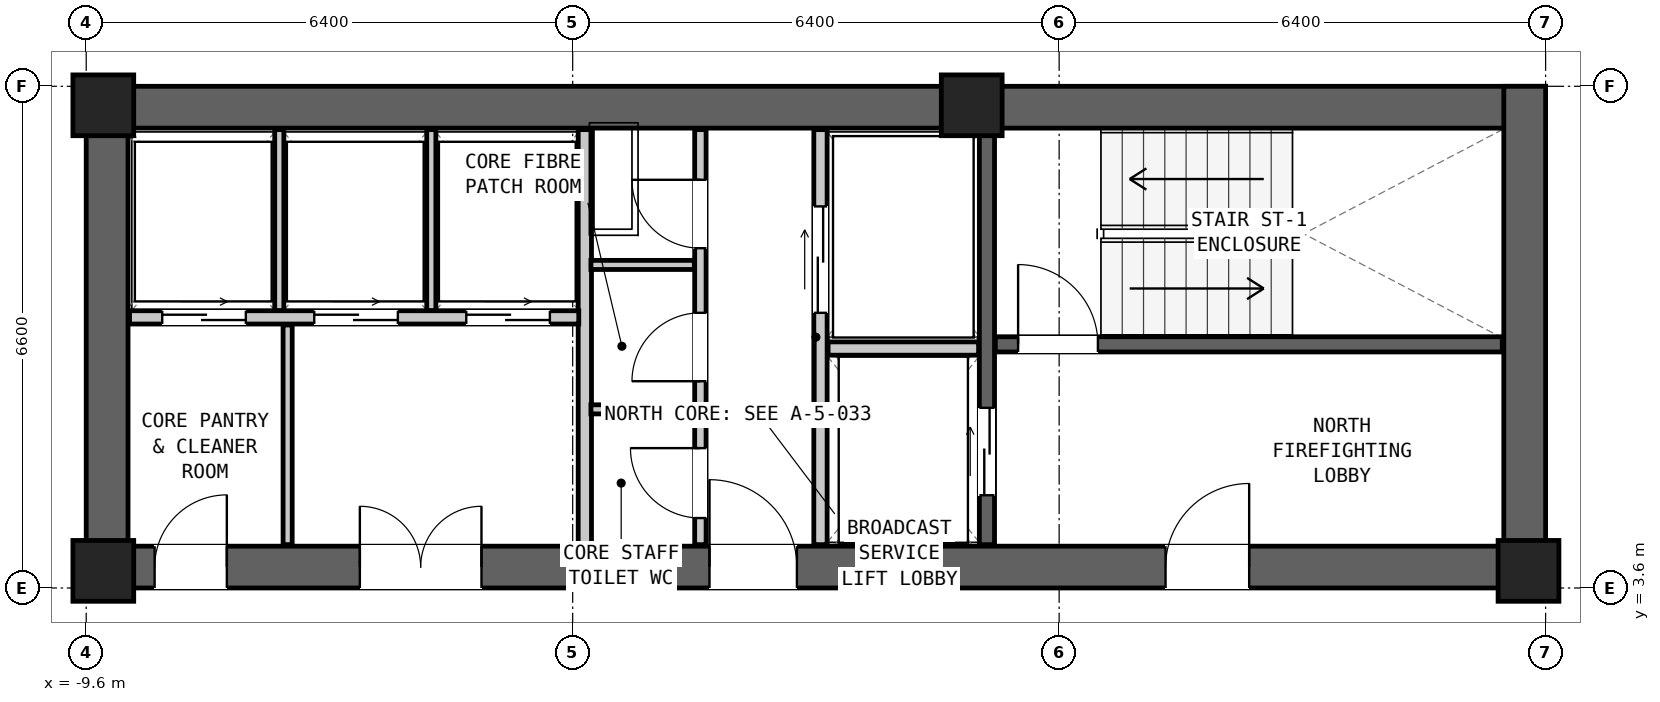
"""IFC4 building model, lengths in metres.
Left out: names, types, materials, properties, quantities, classifications, styles, units other than length and angle.
Written with IfcOpenShell. Run it as: python <this file> out.ifc"""

import sys

from ifc_helpers import new_model, si_unit, direction, frame, frame_2d, origin, origin_2d, place, context, subcontext, project, spatial, rectangle, extrude, element, fill, save


model = new_model("IFC4")
c1 = context("Model", 3, precision=1e-05, world=origin(), true_north=direction((0.0, 1.0)))
c2 = subcontext(c1, "Body", "Model", "MODEL_VIEW")
j1 = project(units=[si_unit("LENGTHUNIT", "METRE"), si_unit("PLANEANGLEUNIT", "RADIAN")], contexts=[c1])
p1 = place(None, origin())
s1 = spatial("IfcSite", under=j1, at=p1, CompositionType="ELEMENT")
p2 = place(p1, origin())
s2 = spatial("IfcBuilding", under=s1, at=p2, CompositionType="ELEMENT")
p3 = place(p2, frame((0.0, 0.0, 104.85)))
s3 = spatial("IfcBuildingStorey", under=s2, at=p3, CompositionType="ELEMENT", Elevation=104.85)
p4 = place(p3, frame((-9.6, 9.925, 0.0), z_axis=(0.0, 0.0, 1.0), x_axis=(1.0, 0.0, 0.0)))
e1 = element("IfcWall", 1, at=p4, inside=s3, PredefinedType="SHEAR", context=c2, shape_type="SweptSolid", body=[
    extrude(rectangle(XDim=19.2, YDim=0.55, at=frame_2d((9.6, 0.0))), origin(), (0.0, 0.0, 1.0), 3.6),
])
p5 = place(p3, frame((-9.6, 3.875, 0.0), z_axis=(0.0, 0.0, 1.0), x_axis=(1.0, 0.0, 0.0)))
e2 = element("IfcWall", 2, at=p5, inside=s3, PredefinedType="SHEAR", context=c2, shape_type="SweptSolid", body=[
    extrude(rectangle(XDim=19.2, YDim=0.55, at=frame_2d((9.6, 0.0))), origin(), (0.0, 0.0, 1.0), 3.6),
])
p6 = place(p5, frame((14.2, 0.0, 0.0)))
e3 = element("IfcOpeningElement", 3, at=p6, cuts=e2, PredefinedType="OPENING", context=c2, shape_type="SweptSolid", body=[
    extrude(rectangle(XDim=1.1, YDim=2.08, at=frame_2d((0.55, 1.04))), frame((0.0, 0.287, 0.0), z_axis=(0.0, -1.0, 0.0), x_axis=(1.0, 0.0, 0.0)), (0.0, 0.0, 1.0), 0.574),
])
p7 = place(p5, frame((8.2, 0.0, 0.0)))
e4 = element("IfcOpeningElement", 4, at=p7, cuts=e2, PredefinedType="OPENING", context=c2, shape_type="SweptSolid", body=[
    extrude(rectangle(XDim=1.15, YDim=2.1, at=frame_2d((0.575, 1.05))), frame((0.0, 0.287, 0.0), z_axis=(0.0, -1.0, 0.0), x_axis=(1.0, 0.0, 0.0)), (0.0, 0.0, 1.0), 0.574),
])
p8 = place(p5, frame((0.9, 0.0, 0.0)))
e5 = element("IfcOpeningElement", 5, at=p8, cuts=e2, PredefinedType="OPENING", context=c2, shape_type="SweptSolid", body=[
    extrude(rectangle(XDim=0.95, YDim=2.1, at=frame_2d((0.475, 1.05))), frame((0.0, 0.287, 0.0), z_axis=(0.0, -1.0, 0.0), x_axis=(1.0, 0.0, 0.0)), (0.0, 0.0, 1.0), 0.574),
])
p9 = place(p5, frame((3.6, 0.0, 0.0)))
e6 = element("IfcOpeningElement", 6, at=p9, cuts=e2, PredefinedType="OPENING", context=c2, shape_type="SweptSolid", body=[
    extrude(rectangle(XDim=1.6, YDim=2.12, at=frame_2d((0.8, 1.06))), frame((0.0, 0.287, 0.0), z_axis=(0.0, -1.0, 0.0), x_axis=(1.0, 0.0, 0.0)), (0.0, 0.0, 1.0), 0.574),
])
for number, where, z_axis, x_axis in (
    (7, (-9.325, 3.6, 0.0), (0.0, 0.0, 1.0), (0.0, 1.0, 0.0)),
    (8, (9.325, 3.6, 0.0), (0.0, 0.0, 1.0), (0.0, 1.0, 0.0)),
):
    element("IfcWall", number, at=place(p3, frame(where, z_axis=z_axis, x_axis=x_axis)), inside=s3, PredefinedType="SHEAR", context=c2, shape_type="SweptSolid", body=[
        extrude(rectangle(XDim=6.6, YDim=0.55, at=frame_2d((3.3, 0.0))), origin(), (0.0, 0.0, 1.0), 3.6),
    ])
for number, where, z_axis, x_axis in (
    (9, (-9.375, 9.95, 0.0), (0.0, 0.0, 1.0), (1.0, 0.0, 0.0)),
    (10, (2.05, 9.95, 0.0), (0.0, 0.0, 1.0), (1.0, 0.0, 0.0)),
    (11, (-9.375, 3.825, 0.0), (0.0, 0.0, 1.0), (1.0, 0.0, 0.0)),
    (12, (9.375, 3.825, 0.0), (0.0, 0.0, 1.0), (1.0, 0.0, 0.0)),
):
    element("IfcColumn", number, at=place(p3, frame(where, z_axis=z_axis, x_axis=x_axis)), inside=s3, PredefinedType="COLUMN", context=c2, shape_type="SweptSolid", body=[
        extrude(rectangle(XDim=0.8, YDim=0.8, at=origin_2d()), origin(), (0.0, 0.0, 1.0), 3.6),
    ])
p10 = place(p3, frame((2.36, 6.805, 0.0), z_axis=(0.0, 0.0, 1.0), x_axis=(1.0, 0.0, 0.0)))
e13 = element("IfcWall", 13, at=p10, inside=s3, PredefinedType="SHEAR", context=c2, shape_type="SweptSolid", body=[
    extrude(rectangle(XDim=6.67, YDim=0.2, at=frame_2d((3.335, 0.0))), origin(), (0.0, 0.0, 1.0), 3.22),
])
p11 = place(p10, frame((0.3, 0.0, 0.0)))
e14 = element("IfcOpeningElement", 14, at=p11, cuts=e13, PredefinedType="OPENING", context=c2, shape_type="SweptSolid", body=[
    extrude(rectangle(XDim=1.05, YDim=2.08, at=frame_2d((0.525, 1.04))), frame((0.0, 0.112, 0.0), z_axis=(0.0, -1.0, 0.0), x_axis=(1.0, 0.0, 0.0)), (0.0, 0.0, 1.0), 0.224),
])
p12 = place(p3, frame((2.25, 4.17, 0.0), z_axis=(0.0, 0.0, 1.0), x_axis=(0.0, 1.0, 0.0)))
e15 = element("IfcWall", 15, at=p12, inside=s3, PredefinedType="SHEAR", context=c2, shape_type="SweptSolid", body=[
    extrude(rectangle(XDim=5.46, YDim=0.2, at=frame_2d((2.73, 0.0))), origin(), (0.0, 0.0, 1.0), 3.22),
])
p13 = place(p12, frame((0.65, 0.0, 0.0)))
e16 = element("IfcOpeningElement", 16, at=p13, cuts=e15, PredefinedType="OPENING", context=c2, shape_type="SweptSolid", body=[
    extrude(rectangle(XDim=1.15, YDim=2.08, at=frame_2d((0.575, 1.04))), frame((0.0, 0.112, 0.0), z_axis=(0.0, -1.0, 0.0), x_axis=(1.0, 0.0, 0.0)), (0.0, 0.0, 1.0), 0.224),
])
p14 = place(p3, frame((0.06, 4.17, 0.0), z_axis=(0.0, 0.0, 1.0), x_axis=(0.0, 1.0, 0.0)))
e17 = element("IfcWall", 17, at=p14, inside=s3, PredefinedType="PARTITIONING", context=c2, shape_type="SweptSolid", body=[
    extrude(rectangle(XDim=5.46, YDim=0.175, at=frame_2d((2.73, 0.0))), origin(), (0.0, 0.0, 1.0), 3.22),
])
p15 = place(p14, frame((3.05, 0.0, 0.0)))
e18 = element("IfcOpeningElement", 18, at=p15, cuts=e17, PredefinedType="OPENING", context=c2, shape_type="SweptSolid", body=[
    extrude(rectangle(XDim=1.4, YDim=2.12, at=frame_2d((0.7, 1.06))), frame((0.0, 0.1, 0.0), z_axis=(0.0, -1.0, 0.0), x_axis=(1.0, 0.0, 0.0)), (0.0, 0.0, 1.0), 0.199),
])
p16 = place(p3, frame((0.16, 6.75, 0.0), z_axis=(0.0, 0.0, 1.0), x_axis=(1.0, 0.0, 0.0)))
e19 = element("IfcWall", 19, at=p16, inside=s3, PredefinedType="PARTITIONING", context=c2, shape_type="SweptSolid", body=[
    extrude(rectangle(XDim=1.98, YDim=0.175, at=frame_2d((0.99, 0.0))), origin(), (0.0, 0.0, 1.0), 3.22),
])
p17 = place(p3, frame((-3.04, 4.17, 0.0), z_axis=(0.0, 0.0, 1.0), x_axis=(0.0, 1.0, 0.0)))
e20 = element("IfcWall", 20, at=p17, inside=s3, PredefinedType="PARTITIONING", context=c2, shape_type="SweptSolid", body=[
    extrude(rectangle(XDim=5.46, YDim=0.175, at=frame_2d((2.73, 0.0))), origin(), (0.0, 0.0, 1.0), 3.22),
])
p18 = place(p3, frame((-1.52, 4.17, 0.0), z_axis=(0.0, 0.0, 1.0), x_axis=(0.0, 1.0, 0.0)))
e21 = element("IfcWall", 21, at=p18, inside=s3, PredefinedType="PARTITIONING", context=c2, shape_type="SweptSolid", body=[
    extrude(rectangle(XDim=5.46, YDim=0.15, at=frame_2d((2.73, 0.0))), origin(), (0.0, 0.0, 1.0), 3.22),
])
p19 = place(p18, frame((3.9, 0.0, 0.0)))
e22 = element("IfcOpeningElement", 22, at=p19, cuts=e21, PredefinedType="OPENING", context=c2, shape_type="SweptSolid", body=[
    extrude(rectangle(XDim=0.9, YDim=2.05, at=frame_2d((0.45, 1.025))), frame((0.0, 0.087, 0.0), z_axis=(0.0, -1.0, 0.0), x_axis=(1.0, 0.0, 0.0)), (0.0, 0.0, 1.0), 0.174),
])
p20 = place(p18, frame((2.15, 0.0, 0.0)))
e23 = element("IfcOpeningElement", 23, at=p20, cuts=e21, PredefinedType="OPENING", context=c2, shape_type="SweptSolid", body=[
    extrude(rectangle(XDim=0.9, YDim=2.05, at=frame_2d((0.45, 1.025))), frame((0.0, 0.087, 0.0), z_axis=(0.0, -1.0, 0.0), x_axis=(1.0, 0.0, 0.0)), (0.0, 0.0, 1.0), 0.174),
])
p21 = place(p18, frame((0.35, 0.0, 0.0)))
e24 = element("IfcOpeningElement", 24, at=p21, cuts=e21, PredefinedType="OPENING", context=c2, shape_type="SweptSolid", body=[
    extrude(rectangle(XDim=0.92, YDim=2.1, at=frame_2d((0.46, 1.05))), frame((0.0, 0.087, 0.0), z_axis=(0.0, -1.0, 0.0), x_axis=(1.0, 0.0, 0.0)), (0.0, 0.0, 1.0), 0.174),
])
for number, where, z_axis, x_axis in (
    (25, (-2.96, 5.95, 0.0), (0.0, 0.0, 1.0), (1.0, 0.0, 0.0)),
    (26, (-2.96, 7.85, 0.0), (0.0, 0.0, 1.0), (1.0, 0.0, 0.0)),
):
    element("IfcWall", number, at=place(p3, frame(where, z_axis=z_axis, x_axis=x_axis)), inside=s3, PredefinedType="PARTITIONING", context=c2, shape_type="SweptSolid", body=[
        extrude(rectangle(XDim=1.36, YDim=0.12, at=frame_2d((0.68, 0.0))), origin(), (0.0, 0.0, 1.0), 3.22),
    ])
p22 = place(p3, frame((-9.03, 7.16, 0.0), z_axis=(0.0, 0.0, 1.0), x_axis=(1.0, 0.0, 0.0)))
e27 = element("IfcWall", 27, at=p22, inside=s3, PredefinedType="PARTITIONING", context=c2, shape_type="SweptSolid", body=[
    extrude(rectangle(XDim=5.91, YDim=0.175, at=frame_2d((2.955, 0.0))), origin(), (0.0, 0.0, 1.0), 3.22),
])
p23 = place(p22, frame((0.43, 0.0, 0.0)))
e28 = element("IfcOpeningElement", 28, at=p23, cuts=e27, PredefinedType="OPENING", context=c2, shape_type="SweptSolid", body=[
    extrude(rectangle(XDim=1.1, YDim=2.06, at=frame_2d((0.55, 1.03))), frame((0.0, 0.1, 0.0), z_axis=(0.0, -1.0, 0.0), x_axis=(1.0, 0.0, 0.0)), (0.0, 0.0, 1.0), 0.199),
])
p24 = place(p22, frame((2.43, 0.0, 0.0)))
e29 = element("IfcOpeningElement", 29, at=p24, cuts=e27, PredefinedType="OPENING", context=c2, shape_type="SweptSolid", body=[
    extrude(rectangle(XDim=1.1, YDim=2.06, at=frame_2d((0.55, 1.03))), frame((0.0, 0.1, 0.0), z_axis=(0.0, -1.0, 0.0), x_axis=(1.0, 0.0, 0.0)), (0.0, 0.0, 1.0), 0.199),
])
p25 = place(p22, frame((4.43, 0.0, 0.0)))
e30 = element("IfcOpeningElement", 30, at=p25, cuts=e27, PredefinedType="OPENING", context=c2, shape_type="SweptSolid", body=[
    extrude(rectangle(XDim=1.1, YDim=2.06, at=frame_2d((0.55, 1.03))), frame((0.0, 0.1, 0.0), z_axis=(0.0, -1.0, 0.0), x_axis=(1.0, 0.0, 0.0)), (0.0, 0.0, 1.0), 0.199),
])
for number, where, z_axis, x_axis in (
    (31, (-7.06, 7.25, 0.0), (0.0, 0.0, 1.0), (0.0, 1.0, 0.0)),
    (32, (-5.06, 7.25, 0.0), (0.0, 0.0, 1.0), (0.0, 1.0, 0.0)),
):
    element("IfcWall", number, at=place(p3, frame(where, z_axis=z_axis, x_axis=x_axis)), inside=s3, PredefinedType="PARTITIONING", context=c2, shape_type="SweptSolid", body=[
        extrude(rectangle(XDim=2.38, YDim=0.12, at=frame_2d((1.19, 0.0))), origin(), (0.0, 0.0, 1.0), 3.22),
    ])
p26 = place(p3, frame((-6.95, 4.17, 0.0), z_axis=(0.0, 0.0, 1.0), x_axis=(0.0, 1.0, 0.0)))
e33 = element("IfcWall", 33, at=p26, inside=s3, PredefinedType="PARTITIONING", context=c2, shape_type="SweptSolid", body=[
    extrude(rectangle(XDim=2.89, YDim=0.12, at=frame_2d((1.445, 0.0))), origin(), (0.0, 0.0, 1.0), 3.22),
])
p27 = place(p11, origin())
e34 = element("IfcDoor", 34, at=p27, inside=s3, OperationType="SINGLE_SWING_LEFT", PredefinedType="DOOR", context=c2, shape_type="SweptSolid", body=[
    extrude(rectangle(XDim=1.05, YDim=2.08, at=frame_2d((0.525, 1.04))), frame((0.0, 0.025, 0.0), z_axis=(0.0, -1.0, 0.0), x_axis=(1.0, 0.0, 0.0)), (0.0, 0.0, 1.0), 0.05),
])
fill(e14, e34)
p28 = place(p6, origin())
e35 = element("IfcDoor", 35, at=p28, inside=s3, OperationType="SINGLE_SWING_RIGHT", PredefinedType="DOOR", context=c2, shape_type="SweptSolid", body=[
    extrude(rectangle(XDim=1.1, YDim=2.08, at=frame_2d((0.55, 1.04))), frame((0.0, 0.025, 0.0), z_axis=(0.0, -1.0, 0.0), x_axis=(1.0, 0.0, 0.0)), (0.0, 0.0, 1.0), 0.05),
])
fill(e3, e35)
p29 = place(p13, origin())
e36 = element("IfcDoor", 36, at=p29, inside=s3, OperationType="DOUBLE_DOOR_SLIDING", PredefinedType="DOOR", context=c2, shape_type="SweptSolid", body=[
    extrude(rectangle(XDim=1.15, YDim=2.08, at=frame_2d((0.575, 1.04))), frame((0.0, 0.025, 0.0), z_axis=(0.0, -1.0, 0.0), x_axis=(1.0, 0.0, 0.0)), (0.0, 0.0, 1.0), 0.05),
])
fill(e16, e36)
p30 = place(p15, origin())
e37 = element("IfcDoor", 37, at=p30, inside=s3, OperationType="DOUBLE_DOOR_SLIDING", PredefinedType="DOOR", context=c2, shape_type="SweptSolid", body=[
    extrude(rectangle(XDim=1.4, YDim=2.12, at=frame_2d((0.7, 1.06))), frame((0.0, 0.025, 0.0), z_axis=(0.0, -1.0, 0.0), x_axis=(1.0, 0.0, 0.0)), (0.0, 0.0, 1.0), 0.05),
])
fill(e18, e37)
p31 = place(p7, origin())
e38 = element("IfcDoor", 38, at=p31, inside=s3, OperationType="SINGLE_SWING_LEFT", PredefinedType="DOOR", context=c2, shape_type="SweptSolid", body=[
    extrude(rectangle(XDim=1.15, YDim=2.1, at=frame_2d((0.575, 1.05))), frame((0.0, 0.025, 0.0), z_axis=(0.0, -1.0, 0.0), x_axis=(1.0, 0.0, 0.0)), (0.0, 0.0, 1.0), 0.05),
])
fill(e4, e38)
p32 = place(p19, origin())
e39 = element("IfcDoor", 39, at=p32, inside=s3, OperationType="SINGLE_SWING_RIGHT", PredefinedType="DOOR", context=c2, shape_type="SweptSolid", body=[
    extrude(rectangle(XDim=0.9, YDim=2.05, at=frame_2d((0.45, 1.025))), frame((0.0, 0.025, 0.0), z_axis=(0.0, -1.0, 0.0), x_axis=(1.0, 0.0, 0.0)), (0.0, 0.0, 1.0), 0.05),
])
fill(e22, e39)
p33 = place(p20, origin())
e40 = element("IfcDoor", 40, at=p33, inside=s3, OperationType="SINGLE_SWING_LEFT", PredefinedType="DOOR", context=c2, shape_type="SweptSolid", body=[
    extrude(rectangle(XDim=0.9, YDim=2.05, at=frame_2d((0.45, 1.025))), frame((0.0, 0.025, 0.0), z_axis=(0.0, -1.0, 0.0), x_axis=(1.0, 0.0, 0.0)), (0.0, 0.0, 1.0), 0.05),
])
fill(e23, e40)
p34 = place(p21, origin())
e41 = element("IfcDoor", 41, at=p34, inside=s3, OperationType="SINGLE_SWING_RIGHT", PredefinedType="DOOR", context=c2, shape_type="SweptSolid", body=[
    extrude(rectangle(XDim=0.92, YDim=2.1, at=frame_2d((0.46, 1.05))), frame((0.0, 0.025, 0.0), z_axis=(0.0, -1.0, 0.0), x_axis=(1.0, 0.0, 0.0)), (0.0, 0.0, 1.0), 0.05),
])
fill(e24, e41)
p35 = place(p23, origin())
e42 = element("IfcDoor", 42, at=p35, inside=s3, OperationType="DOUBLE_DOOR_SLIDING", PredefinedType="DOOR", context=c2, shape_type="SweptSolid", body=[
    extrude(rectangle(XDim=1.1, YDim=2.06, at=frame_2d((0.55, 1.03))), frame((0.0, 0.025, 0.0), z_axis=(0.0, -1.0, 0.0), x_axis=(1.0, 0.0, 0.0)), (0.0, 0.0, 1.0), 0.05),
])
fill(e28, e42)
p36 = place(p24, origin())
e43 = element("IfcDoor", 43, at=p36, inside=s3, OperationType="DOUBLE_DOOR_SLIDING", PredefinedType="DOOR", context=c2, shape_type="SweptSolid", body=[
    extrude(rectangle(XDim=1.1, YDim=2.06, at=frame_2d((0.55, 1.03))), frame((0.0, 0.025, 0.0), z_axis=(0.0, -1.0, 0.0), x_axis=(1.0, 0.0, 0.0)), (0.0, 0.0, 1.0), 0.05),
])
fill(e29, e43)
p37 = place(p25, origin())
e44 = element("IfcDoor", 44, at=p37, inside=s3, OperationType="DOUBLE_DOOR_SLIDING", PredefinedType="DOOR", context=c2, shape_type="SweptSolid", body=[
    extrude(rectangle(XDim=1.1, YDim=2.06, at=frame_2d((0.55, 1.03))), frame((0.0, 0.025, 0.0), z_axis=(0.0, -1.0, 0.0), x_axis=(1.0, 0.0, 0.0)), (0.0, 0.0, 1.0), 0.05),
])
fill(e30, e44)
p38 = place(p8, origin())
e45 = element("IfcDoor", 45, at=p38, inside=s3, OperationType="SINGLE_SWING_RIGHT", PredefinedType="DOOR", context=c2, shape_type="SweptSolid", body=[
    extrude(rectangle(XDim=0.95, YDim=2.1, at=frame_2d((0.475, 1.05))), frame((0.0, 0.025, 0.0), z_axis=(0.0, -1.0, 0.0), x_axis=(1.0, 0.0, 0.0)), (0.0, 0.0, 1.0), 0.05),
])
fill(e5, e45)
p39 = place(p9, origin())
e46 = element("IfcDoor", 46, at=p39, inside=s3, OperationType="DOUBLE_DOOR_SINGLE_SWING", PredefinedType="DOOR", context=c2, shape_type="SweptSolid", body=[
    extrude(rectangle(XDim=1.6, YDim=2.12, at=frame_2d((0.8, 1.06))), frame((0.0, 0.025, 0.0), z_axis=(0.0, -1.0, 0.0), x_axis=(1.0, 0.0, 0.0)), (0.0, 0.0, 1.0), 0.05),
])
fill(e6, e46)
save(model, sys.argv[1])
